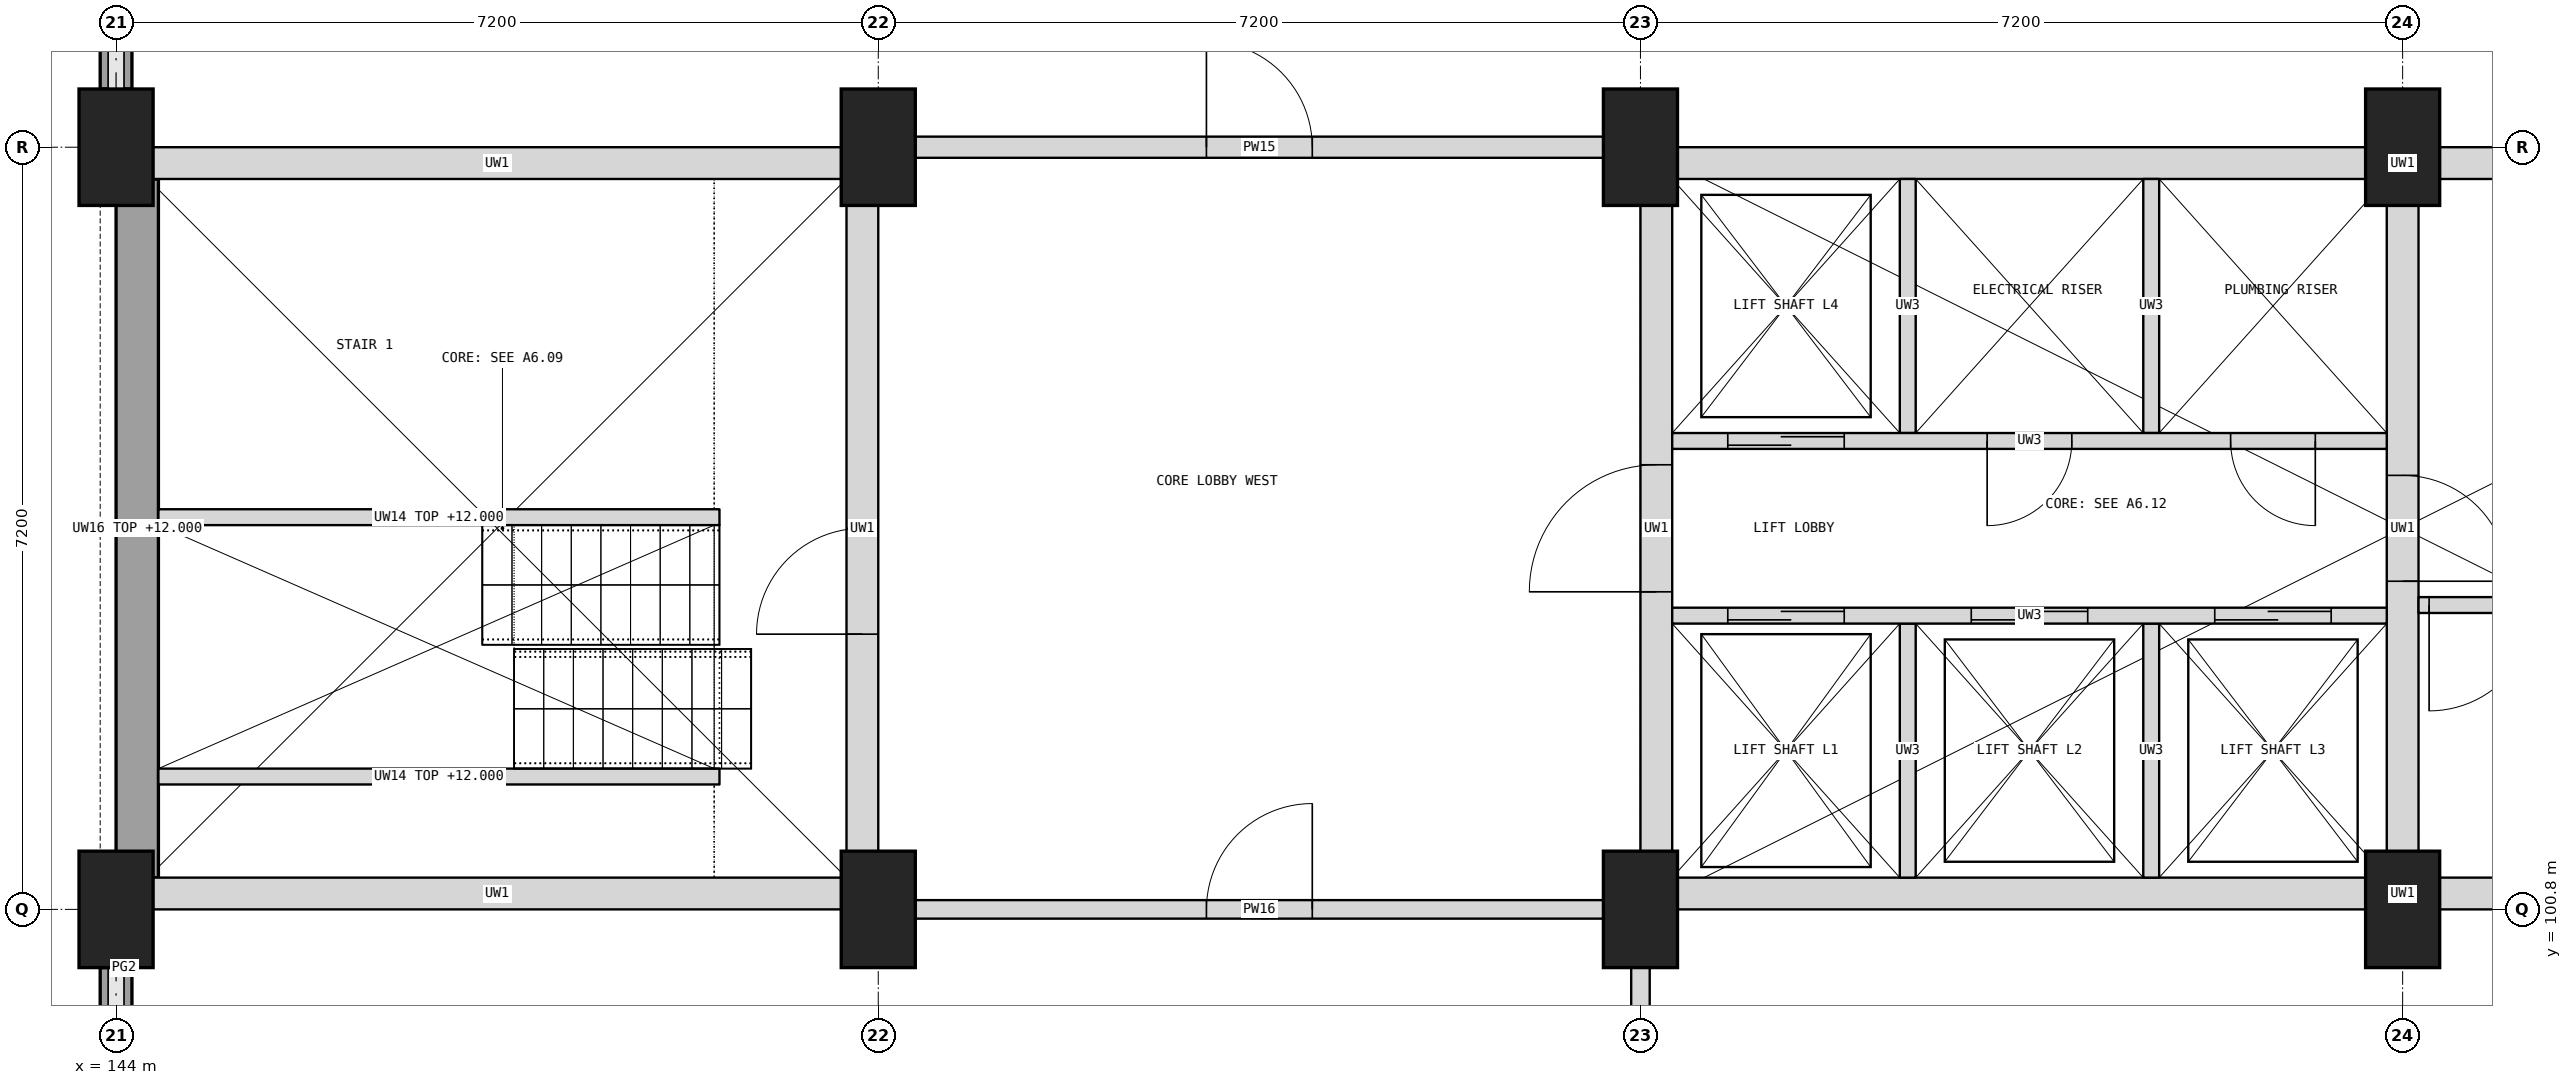
"""IFC4 building model, lengths in metres.
Left out: names, types, materials, properties, quantities, classifications, styles, units other than length and angle.
Written with IfcOpenShell. Run it as: python <this file> out.ifc"""

import sys

from ifc_helpers import new_model, si_unit, direction, frame, frame_2d, origin, origin_2d, place, context, subcontext, project, spatial, rectangle, extrude, element, fill, save


model = new_model("IFC4")
c1 = context("Model", 3, precision=1e-05, world=origin(), true_north=direction((0.0, 1.0)))
c2 = subcontext(c1, "Body", "Model", "MODEL_VIEW")
j1 = project(units=[si_unit("LENGTHUNIT", "METRE"), si_unit("PLANEANGLEUNIT", "RADIAN")], contexts=[c1])
p1 = place(None, origin())
s1 = spatial("IfcSite", under=j1, at=p1, CompositionType="ELEMENT")
p2 = place(p1, origin())
s2 = spatial("IfcBuilding", under=s1, at=p2, CompositionType="ELEMENT")
p3 = place(p2, frame((0.0, 0.0, 6.0)))
s3 = spatial("IfcBuildingStorey", under=s2, at=p3, CompositionType="ELEMENT", Elevation=6.0)
for number, where, z_axis, x_axis in (
    (1, (144.0, 100.8, 0.0), (0.0, 0.0, 1.0), (1.0, 0.0, 0.0)),
    (2, (144.0, 108.0, 0.0), (0.0, 0.0, 1.0), (1.0, 0.0, 0.0)),
    (3, (151.2, 100.8, 0.0), (0.0, 0.0, 1.0), (1.0, 0.0, 0.0)),
    (4, (151.2, 108.0, 0.0), (0.0, 0.0, 1.0), (1.0, 0.0, 0.0)),
    (5, (158.4, 100.8, 0.0), (0.0, 0.0, 1.0), (1.0, 0.0, 0.0)),
    (6, (158.4, 108.0, 0.0), (0.0, 0.0, 1.0), (1.0, 0.0, 0.0)),
    (7, (165.6, 100.8, 0.0), (0.0, 0.0, 1.0), (1.0, 0.0, 0.0)),
    (8, (165.6, 108.0, 0.0), (0.0, 0.0, 1.0), (1.0, 0.0, 0.0)),
):
    element("IfcColumn", number, at=place(p3, frame(where, z_axis=z_axis, x_axis=x_axis)), inside=s3, PredefinedType="COLUMN", context=c2, shape_type="SweptSolid", body=[
        extrude(rectangle(XDim=0.7, YDim=1.1, at=origin_2d()), origin(), (0.0, 0.0, 1.0), 6.0),
    ])
for number, where, z_axis, x_axis in (
    (9, (158.4, 100.95, 0.0), (0.0, 0.0, 1.0), (1.0, 0.0, 0.0)),
    (10, (158.4, 107.85, 0.0), (0.0, 0.0, 1.0), (1.0, 0.0, 0.0)),
):
    element("IfcWall", number, at=place(p3, frame(where, z_axis=z_axis, x_axis=x_axis)), inside=s3, PredefinedType="SHEAR", context=c2, shape_type="SweptSolid", body=[
        extrude(rectangle(XDim=14.4, YDim=0.3, at=frame_2d((7.2, 0.0))), origin(), (0.0, 0.0, 1.0), 6.0),
    ])
p4 = place(p3, frame((158.55, 101.1, 0.0), z_axis=(0.0, 0.0, 1.0), x_axis=(0.0, 1.0, 0.0)))
e11 = element("IfcWall", 11, at=p4, inside=s3, PredefinedType="SHEAR", context=c2, shape_type="SweptSolid", body=[
    extrude(rectangle(XDim=6.6, YDim=0.3, at=frame_2d((3.3, 0.0))), origin(), (0.0, 0.0, 1.0), 6.0),
])
p5 = place(p4, frame((2.7, 0.0, 0.0)))
e12 = element("IfcOpeningElement", 12, at=p5, cuts=e11, PredefinedType="OPENING", context=c2, shape_type="SweptSolid", body=[
    extrude(rectangle(XDim=1.2, YDim=2.1, at=frame_2d((0.6, 1.05))), frame((0.0, 0.16, 0.0), z_axis=(0.0, -1.0, 0.0), x_axis=(1.0, 0.0, 0.0)), (0.0, 0.0, 1.0), 0.32),
])
p6 = place(p3, frame((165.6, 101.1, 0.0), z_axis=(0.0, 0.0, 1.0), x_axis=(0.0, 1.0, 0.0)))
e13 = element("IfcWall", 13, at=p6, inside=s3, PredefinedType="SHEAR", context=c2, shape_type="SweptSolid", body=[
    extrude(rectangle(XDim=6.6, YDim=0.3, at=frame_2d((3.3, 0.0))), origin(), (0.0, 0.0, 1.0), 6.0),
])
p7 = place(p6, frame((2.8, 0.0, 0.0)))
e14 = element("IfcOpeningElement", 14, at=p7, cuts=e13, PredefinedType="OPENING", context=c2, shape_type="SweptSolid", body=[
    extrude(rectangle(XDim=1.0, YDim=2.1, at=frame_2d((0.5, 1.05))), frame((0.0, 0.16, 0.0), z_axis=(0.0, -1.0, 0.0), x_axis=(1.0, 0.0, 0.0)), (0.0, 0.0, 1.0), 0.32),
])
for number, where, z_axis, x_axis in (
    (15, (160.925, 101.1, 0.0), (0.0, 0.0, 1.0), (0.0, 1.0, 0.0)),
    (16, (163.225, 101.1, 0.0), (0.0, 0.0, 1.0), (0.0, 1.0, 0.0)),
    (17, (160.925, 105.3, 0.0), (0.0, 0.0, 1.0), (0.0, 1.0, 0.0)),
    (18, (163.225, 105.3, 0.0), (0.0, 0.0, 1.0), (0.0, 1.0, 0.0)),
):
    element("IfcWall", number, at=place(p3, frame(where, z_axis=z_axis, x_axis=x_axis)), inside=s3, PredefinedType="PARTITIONING", context=c2, shape_type="SweptSolid", body=[
        extrude(rectangle(XDim=2.4, YDim=0.15, at=frame_2d((1.2, 0.0))), origin(), (0.0, 0.0, 1.0), 6.0),
    ])
p8 = place(p3, frame((158.7, 103.575, 0.0), z_axis=(0.0, 0.0, 1.0), x_axis=(1.0, 0.0, 0.0)))
e19 = element("IfcWall", 19, at=p8, inside=s3, PredefinedType="PARTITIONING", context=c2, shape_type="SweptSolid", body=[
    extrude(rectangle(XDim=6.75, YDim=0.15, at=frame_2d((3.375, 0.0))), origin(), (0.0, 0.0, 1.0), 6.0),
])
p9 = place(p8, frame((0.525, 0.0, 0.0)))
e20 = element("IfcOpeningElement", 20, at=p9, cuts=e19, PredefinedType="OPENING", context=c2, shape_type="SweptSolid", body=[
    extrude(rectangle(XDim=1.1, YDim=2.1, at=frame_2d((0.55, 1.05))), frame((0.0, 0.085, 0.0), z_axis=(0.0, -1.0, 0.0), x_axis=(1.0, 0.0, 0.0)), (0.0, 0.0, 1.0), 0.17),
])
p10 = place(p8, frame((2.825, 0.0, 0.0)))
e21 = element("IfcOpeningElement", 21, at=p10, cuts=e19, PredefinedType="OPENING", context=c2, shape_type="SweptSolid", body=[
    extrude(rectangle(XDim=1.1, YDim=2.1, at=frame_2d((0.55, 1.05))), frame((0.0, 0.085, 0.0), z_axis=(0.0, -1.0, 0.0), x_axis=(1.0, 0.0, 0.0)), (0.0, 0.0, 1.0), 0.17),
])
p11 = place(p8, frame((5.125, 0.0, 0.0)))
e22 = element("IfcOpeningElement", 22, at=p11, cuts=e19, PredefinedType="OPENING", context=c2, shape_type="SweptSolid", body=[
    extrude(rectangle(XDim=1.1, YDim=2.1, at=frame_2d((0.55, 1.05))), frame((0.0, 0.085, 0.0), z_axis=(0.0, -1.0, 0.0), x_axis=(1.0, 0.0, 0.0)), (0.0, 0.0, 1.0), 0.17),
])
p12 = place(p3, frame((158.7, 105.225, 0.0), z_axis=(0.0, 0.0, 1.0), x_axis=(1.0, 0.0, 0.0)))
e23 = element("IfcWall", 23, at=p12, inside=s3, PredefinedType="PARTITIONING", context=c2, shape_type="SweptSolid", body=[
    extrude(rectangle(XDim=6.75, YDim=0.15, at=frame_2d((3.375, 0.0))), origin(), (0.0, 0.0, 1.0), 6.0),
])
p13 = place(p12, frame((0.525, 0.0, 0.0)))
e24 = element("IfcOpeningElement", 24, at=p13, cuts=e23, PredefinedType="OPENING", context=c2, shape_type="SweptSolid", body=[
    extrude(rectangle(XDim=1.1, YDim=2.1, at=frame_2d((0.55, 1.05))), frame((0.0, 0.085, 0.0), z_axis=(0.0, -1.0, 0.0), x_axis=(1.0, 0.0, 0.0)), (0.0, 0.0, 1.0), 0.17),
])
p14 = place(p12, frame((2.975, 0.0, 0.0)))
e25 = element("IfcOpeningElement", 25, at=p14, cuts=e23, PredefinedType="OPENING", context=c2, shape_type="SweptSolid", body=[
    extrude(rectangle(XDim=0.8, YDim=2.1, at=frame_2d((0.4, 1.05))), frame((0.0, 0.085, 0.0), z_axis=(0.0, -1.0, 0.0), x_axis=(1.0, 0.0, 0.0)), (0.0, 0.0, 1.0), 0.17),
])
p15 = place(p12, frame((5.275, 0.0, 0.0)))
e26 = element("IfcOpeningElement", 26, at=p15, cuts=e23, PredefinedType="OPENING", context=c2, shape_type="SweptSolid", body=[
    extrude(rectangle(XDim=0.8, YDim=2.1, at=frame_2d((0.4, 1.05))), frame((0.0, 0.085, 0.0), z_axis=(0.0, -1.0, 0.0), x_axis=(1.0, 0.0, 0.0)), (0.0, 0.0, 1.0), 0.17),
])
p16 = place(p3, frame((165.75, 103.675, 0.0), z_axis=(0.0, 0.0, 1.0), x_axis=(1.0, 0.0, 0.0)))
e27 = element("IfcWall", 27, at=p16, inside=s3, PredefinedType="SHEAR", context=c2, shape_type="SweptSolid", body=[
    extrude(rectangle(XDim=6.75, YDim=0.15, at=frame_2d((3.375, 0.0))), origin(), (0.0, 0.0, 1.0), 6.0),
])
p17 = place(p16, frame((0.1, 0.0, 0.0)))
e28 = element("IfcOpeningElement", 28, at=p17, cuts=e27, PredefinedType="OPENING", context=c2, shape_type="SweptSolid", body=[
    extrude(rectangle(XDim=1.0, YDim=2.1, at=frame_2d((0.5, 1.05))), frame((0.0, 0.085, 0.0), z_axis=(0.0, -1.0, 0.0), x_axis=(1.0, 0.0, 0.0)), (0.0, 0.0, 1.0), 0.17),
])
for number, where, z_axis, x_axis in (
    (29, (144.0, 100.95, 0.0), (0.0, 0.0, 1.0), (1.0, 0.0, 0.0)),
    (30, (144.0, 107.85, 0.0), (0.0, 0.0, 1.0), (1.0, 0.0, 0.0)),
):
    element("IfcWall", number, at=place(p3, frame(where, z_axis=z_axis, x_axis=x_axis)), inside=s3, PredefinedType="SHEAR", context=c2, shape_type="SweptSolid", body=[
        extrude(rectangle(XDim=7.2, YDim=0.3, at=frame_2d((3.6, 0.0))), origin(), (0.0, 0.0, 1.0), 6.0),
    ])
p18 = place(p3, frame((151.05, 101.1, 0.0), z_axis=(0.0, 0.0, 1.0), x_axis=(0.0, 1.0, 0.0)))
e31 = element("IfcWall", 31, at=p18, inside=s3, PredefinedType="SHEAR", context=c2, shape_type="SweptSolid", body=[
    extrude(rectangle(XDim=6.6, YDim=0.3, at=frame_2d((3.3, 0.0))), origin(), (0.0, 0.0, 1.0), 6.0),
])
p19 = place(p18, frame((2.3, 0.0, 0.0)))
e32 = element("IfcOpeningElement", 32, at=p19, cuts=e31, PredefinedType="OPENING", context=c2, shape_type="SweptSolid", body=[
    extrude(rectangle(XDim=1.0, YDim=2.1, at=frame_2d((0.5, 1.05))), frame((0.0, 0.16, 0.0), z_axis=(0.0, -1.0, 0.0), x_axis=(1.0, 0.0, 0.0)), (0.0, 0.0, 1.0), 0.32),
])
p20 = place(p3, frame((144.2, 101.1, 0.0), z_axis=(0.0, 0.0, 1.0), x_axis=(0.0, 1.0, 0.0)))
e33 = element("IfcWall", 33, at=p20, inside=s3, PredefinedType="SHEAR", context=c2, shape_type="SweptSolid", body=[
    extrude(rectangle(XDim=6.6, YDim=0.4, at=frame_2d((3.3, 0.0))), origin(), (0.0, 0.0, 1.0), 6.0),
])
for number, where, z_axis, x_axis in (
    (34, (144.4, 102.055, 0.0), (0.0, 0.0, 1.0), (1.0, 0.0, 0.0)),
    (35, (144.4, 104.505, 0.0), (0.0, 0.0, 1.0), (1.0, 0.0, 0.0)),
):
    element("IfcWall", number, at=place(p3, frame(where, z_axis=z_axis, x_axis=x_axis)), inside=s3, PredefinedType="SHEAR", context=c2, shape_type="SweptSolid", body=[
        extrude(rectangle(XDim=5.3, YDim=0.15, at=frame_2d((2.65, 0.0))), origin(), (0.0, 0.0, 1.0), 6.0),
    ])
p21 = place(p3, frame((144.0, 94.15, 0.0), z_axis=(0.0, 0.0, 1.0), x_axis=(0.0, 1.0, 0.0)))
e36 = element("IfcWall", 36, at=p21, inside=s3, PredefinedType="SOLIDWALL", context=c2, shape_type="SweptSolid", body=[
    extrude(rectangle(XDim=6.1, YDim=0.3, at=frame_2d((3.05, 0.0))), origin(), (0.0, 0.0, 1.0), 0.9),
])
p22 = place(p3, frame((144.0, 108.55, 0.0), z_axis=(0.0, 0.0, 1.0), x_axis=(0.0, 1.0, 0.0)))
e37 = element("IfcWall", 37, at=p22, inside=s3, PredefinedType="SOLIDWALL", context=c2, shape_type="SweptSolid", body=[
    extrude(rectangle(XDim=6.1, YDim=0.3, at=frame_2d((3.05, 0.0))), origin(), (0.0, 0.0, 1.0), 0.9),
])
p23 = place(p3, frame((158.4, 96.087, 0.0), z_axis=(0.0, 0.0, 1.0), x_axis=(0.0, 1.0, 0.0)))
e38 = element("IfcWall", 38, at=p23, inside=s3, PredefinedType="PARTITIONING", context=c2, shape_type="SweptSolid", body=[
    extrude(rectangle(XDim=4.163, YDim=0.175, at=frame_2d((2.081, 0.0))), origin(), (0.0, 0.0, 1.0), 5.5),
])
p24 = place(p3, frame((151.55, 108.0, 0.0), z_axis=(0.0, 0.0, 1.0), x_axis=(1.0, 0.0, 0.0)))
e39 = element("IfcWall", 39, at=p24, inside=s3, PredefinedType="PARTITIONING", context=c2, shape_type="SweptSolid", body=[
    extrude(rectangle(XDim=6.5, YDim=0.2, at=frame_2d((3.25, 0.0))), origin(), (0.0, 0.0, 1.0), 5.5),
])
p25 = place(p24, frame((2.75, 0.0, 0.0)))
e40 = element("IfcOpeningElement", 40, at=p25, cuts=e39, PredefinedType="OPENING", context=c2, shape_type="SweptSolid", body=[
    extrude(rectangle(XDim=1.0, YDim=2.1, at=frame_2d((0.5, 1.05))), frame((0.0, 0.11, 0.0), z_axis=(0.0, -1.0, 0.0), x_axis=(1.0, 0.0, 0.0)), (0.0, 0.0, 1.0), 0.22),
])
p26 = place(p3, frame((151.55, 100.8, 0.0), z_axis=(0.0, 0.0, 1.0), x_axis=(1.0, 0.0, 0.0)))
e41 = element("IfcWall", 41, at=p26, inside=s3, PredefinedType="PARTITIONING", context=c2, shape_type="SweptSolid", body=[
    extrude(rectangle(XDim=6.5, YDim=0.175, at=frame_2d((3.25, 0.0))), origin(), (0.0, 0.0, 1.0), 5.5),
])
p27 = place(p26, frame((2.75, 0.0, 0.0)))
e42 = element("IfcOpeningElement", 42, at=p27, cuts=e41, PredefinedType="OPENING", context=c2, shape_type="SweptSolid", body=[
    extrude(rectangle(XDim=1.0, YDim=2.1, at=frame_2d((0.5, 1.05))), frame((0.0, 0.097, 0.0), z_axis=(0.0, -1.0, 0.0), x_axis=(1.0, 0.0, 0.0)), (0.0, 0.0, 1.0), 0.195),
])
p28 = place(p27, origin())
e43 = element("IfcDoor", 43, at=p28, inside=s3, OperationType="SINGLE_SWING_RIGHT", PredefinedType="DOOR", context=c2, shape_type="SweptSolid", body=[
    extrude(rectangle(XDim=1.0, YDim=2.1, at=frame_2d((0.5, 1.05))), frame((0.0, 0.025, 0.0), z_axis=(0.0, -1.0, 0.0), x_axis=(1.0, 0.0, 0.0)), (0.0, 0.0, 1.0), 0.05),
])
fill(e42, e43)
p29 = place(p25, origin())
e44 = element("IfcDoor", 44, at=p29, inside=s3, OperationType="SINGLE_SWING_LEFT", PredefinedType="DOOR", context=c2, shape_type="SweptSolid", body=[
    extrude(rectangle(XDim=1.0, YDim=2.1, at=frame_2d((0.5, 1.05))), frame((0.0, 0.025, 0.0), z_axis=(0.0, -1.0, 0.0), x_axis=(1.0, 0.0, 0.0)), (0.0, 0.0, 1.0), 0.05),
])
fill(e40, e44)
p30 = place(p9, origin())
e45 = element("IfcDoor", 45, at=p30, inside=s3, OperationType="DOUBLE_DOOR_SLIDING", PredefinedType="DOOR", context=c2, shape_type="SweptSolid", body=[
    extrude(rectangle(XDim=1.1, YDim=2.1, at=frame_2d((0.55, 1.05))), frame((0.0, 0.025, 0.0), z_axis=(0.0, -1.0, 0.0), x_axis=(1.0, 0.0, 0.0)), (0.0, 0.0, 1.0), 0.05),
])
fill(e20, e45)
p31 = place(p10, origin())
e46 = element("IfcDoor", 46, at=p31, inside=s3, OperationType="DOUBLE_DOOR_SLIDING", PredefinedType="DOOR", context=c2, shape_type="SweptSolid", body=[
    extrude(rectangle(XDim=1.1, YDim=2.1, at=frame_2d((0.55, 1.05))), frame((0.0, 0.025, 0.0), z_axis=(0.0, -1.0, 0.0), x_axis=(1.0, 0.0, 0.0)), (0.0, 0.0, 1.0), 0.05),
])
fill(e21, e46)
p32 = place(p11, origin())
e47 = element("IfcDoor", 47, at=p32, inside=s3, OperationType="DOUBLE_DOOR_SLIDING", PredefinedType="DOOR", context=c2, shape_type="SweptSolid", body=[
    extrude(rectangle(XDim=1.1, YDim=2.1, at=frame_2d((0.55, 1.05))), frame((0.0, 0.025, 0.0), z_axis=(0.0, -1.0, 0.0), x_axis=(1.0, 0.0, 0.0)), (0.0, 0.0, 1.0), 0.05),
])
fill(e22, e47)
p33 = place(p13, origin())
e48 = element("IfcDoor", 48, at=p33, inside=s3, OperationType="DOUBLE_DOOR_SLIDING", PredefinedType="DOOR", context=c2, shape_type="SweptSolid", body=[
    extrude(rectangle(XDim=1.1, YDim=2.1, at=frame_2d((0.55, 1.05))), frame((0.0, 0.025, 0.0), z_axis=(0.0, -1.0, 0.0), x_axis=(1.0, 0.0, 0.0)), (0.0, 0.0, 1.0), 0.05),
])
fill(e24, e48)
p34 = place(p14, frame((0.8, 0.0, 0.0), z_axis=(0.0, 0.0, 1.0), x_axis=(-1.0, 0.0, 0.0)))
e49 = element("IfcDoor", 49, at=p34, inside=s3, OperationType="SINGLE_SWING_RIGHT", PredefinedType="DOOR", context=c2, shape_type="SweptSolid", body=[
    extrude(rectangle(XDim=0.8, YDim=2.1, at=frame_2d((0.4, 1.05))), frame((0.0, 0.025, 0.0), z_axis=(0.0, -1.0, 0.0), x_axis=(1.0, 0.0, 0.0)), (0.0, 0.0, 1.0), 0.05),
])
fill(e25, e49)
p35 = place(p15, frame((0.8, 0.0, 0.0), z_axis=(0.0, 0.0, 1.0), x_axis=(-1.0, 0.0, 0.0)))
e50 = element("IfcDoor", 50, at=p35, inside=s3, OperationType="SINGLE_SWING_LEFT", PredefinedType="DOOR", context=c2, shape_type="SweptSolid", body=[
    extrude(rectangle(XDim=0.8, YDim=2.1, at=frame_2d((0.4, 1.05))), frame((0.0, 0.025, 0.0), z_axis=(0.0, -1.0, 0.0), x_axis=(1.0, 0.0, 0.0)), (0.0, 0.0, 1.0), 0.05),
])
fill(e26, e50)
p36 = place(p5, origin())
e51 = element("IfcDoor", 51, at=p36, inside=s3, OperationType="SINGLE_SWING_LEFT", PredefinedType="DOOR", context=c2, shape_type="SweptSolid", body=[
    extrude(rectangle(XDim=1.2, YDim=2.1, at=frame_2d((0.6, 1.05))), frame((0.0, 0.025, 0.0), z_axis=(0.0, -1.0, 0.0), x_axis=(1.0, 0.0, 0.0)), (0.0, 0.0, 1.0), 0.05),
])
fill(e12, e51)
p37 = place(p7, frame((1.0, 0.0, 0.0), z_axis=(0.0, 0.0, 1.0), x_axis=(-1.0, 0.0, 0.0)))
e52 = element("IfcDoor", 52, at=p37, inside=s3, OperationType="SINGLE_SWING_RIGHT", PredefinedType="DOOR", context=c2, shape_type="SweptSolid", body=[
    extrude(rectangle(XDim=1.0, YDim=2.1, at=frame_2d((0.5, 1.05))), frame((0.0, 0.025, 0.0), z_axis=(0.0, -1.0, 0.0), x_axis=(1.0, 0.0, 0.0)), (0.0, 0.0, 1.0), 0.05),
])
fill(e14, e52)
p38 = place(p17, frame((1.0, 0.0, 0.0), z_axis=(0.0, 0.0, 1.0), x_axis=(-1.0, 0.0, 0.0)))
e53 = element("IfcDoor", 53, at=p38, inside=s3, OperationType="SINGLE_SWING_RIGHT", PredefinedType="DOOR", context=c2, shape_type="SweptSolid", body=[
    extrude(rectangle(XDim=1.0, YDim=2.1, at=frame_2d((0.5, 1.05))), frame((0.0, 0.025, 0.0), z_axis=(0.0, -1.0, 0.0), x_axis=(1.0, 0.0, 0.0)), (0.0, 0.0, 1.0), 0.05),
])
fill(e28, e53)
p39 = place(p19, origin())
e54 = element("IfcDoor", 54, at=p39, inside=s3, OperationType="SINGLE_SWING_LEFT", PredefinedType="DOOR", context=c2, shape_type="SweptSolid", body=[
    extrude(rectangle(XDim=1.0, YDim=2.1, at=frame_2d((0.5, 1.05))), frame((0.0, 0.025, 0.0), z_axis=(0.0, -1.0, 0.0), x_axis=(1.0, 0.0, 0.0)), (0.0, 0.0, 1.0), 0.05),
])
fill(e32, e54)
save(model, sys.argv[1])
